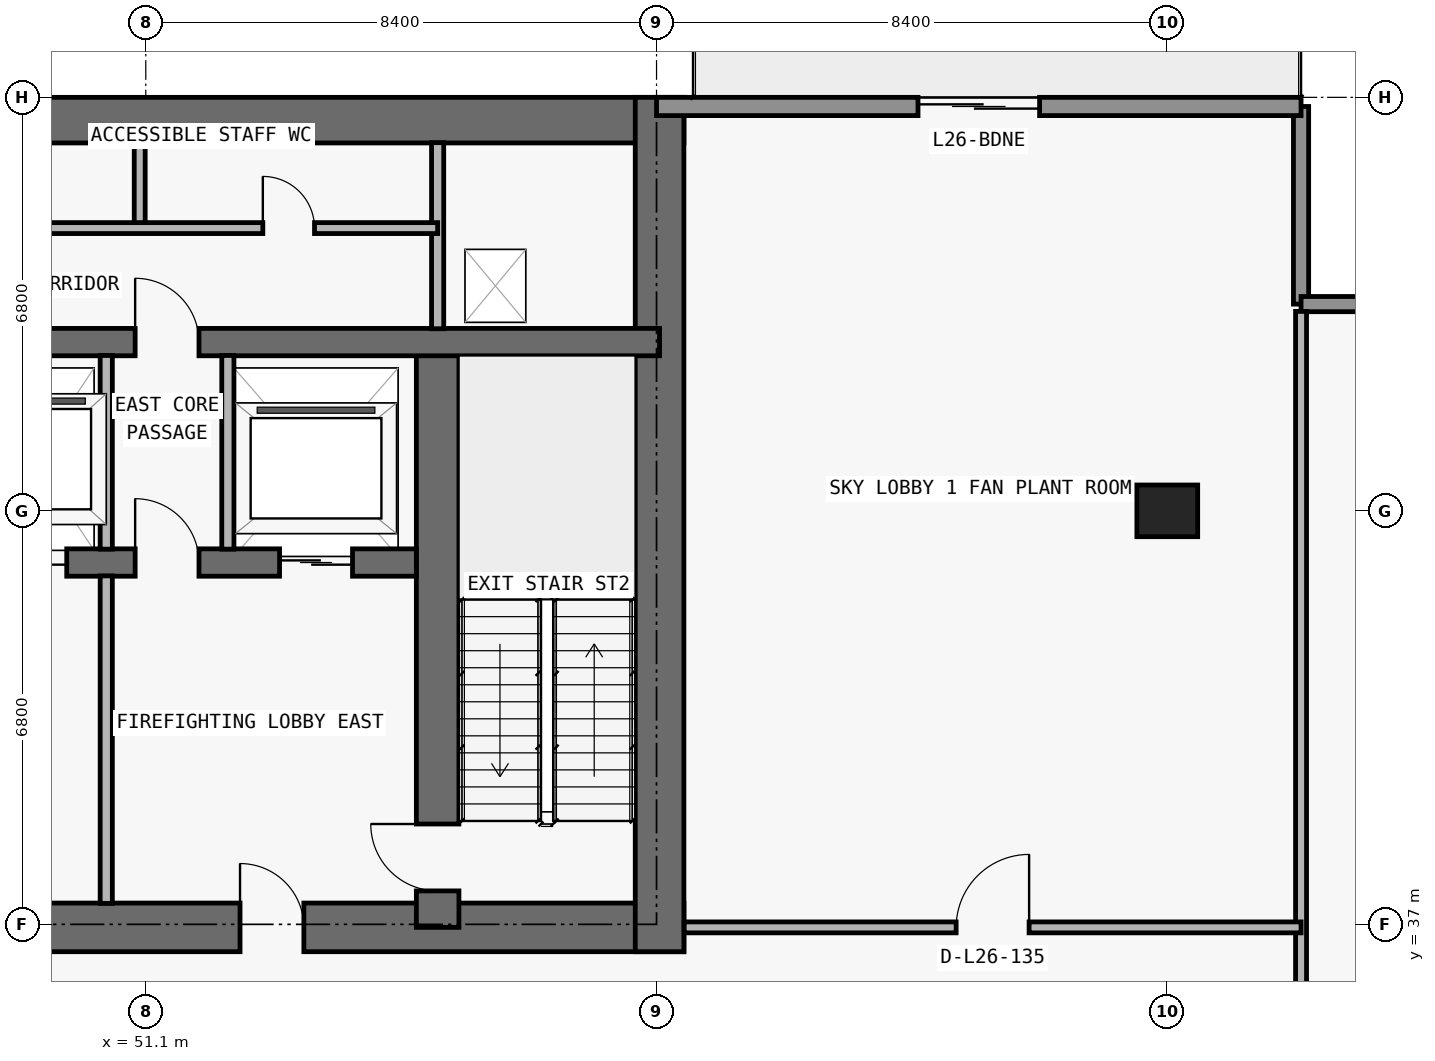
"""IFC4 building model, lengths in metres.
Left out: names, types, materials, properties, quantities, classifications, styles, units other than length and angle.
Written with IfcOpenShell. Run it as: python <this file> out.ifc"""

import sys

from ifc_helpers import new_model, si_unit, direction, frame, frame_2d, origin, origin_2d, place, context, subcontext, project, spatial, rectangle, extrude, element, fill, save


model = new_model("IFC4")
c1 = context("Model", 3, precision=1e-05, world=origin(), true_north=direction((0.0, 1.0)))
c2 = subcontext(c1, "Body", "Model", "MODEL_VIEW")
j1 = project(units=[si_unit("LENGTHUNIT", "METRE"), si_unit("PLANEANGLEUNIT", "RADIAN")], contexts=[c1])
p1 = place(None, origin())
s1 = spatial("IfcSite", under=j1, at=p1, CompositionType="ELEMENT")
p2 = place(p1, origin())
s2 = spatial("IfcBuilding", under=s1, at=p2, CompositionType="ELEMENT")
p3 = place(p2, frame((0.0, 0.0, 97.8)))
s3 = spatial("IfcBuildingStorey", under=s2, at=p3, CompositionType="ELEMENT", Elevation=97.8)
p4 = place(p3, frame((67.9, 43.8, 0.0), z_axis=(0.0, 0.0, 1.0), x_axis=(1.0, 0.0, 0.0)))
e1 = element("IfcColumn", 1, at=p4, inside=s3, PredefinedType="COLUMN", context=c2, shape_type="SweptSolid", body=[
    extrude(rectangle(XDim=1.0, YDim=0.85, at=origin_2d()), origin(), (0.0, 0.0, 1.0), 4.55),
])
p5 = place(p3, frame((17.85, 36.95, 0.0), z_axis=(0.0, 0.0, 1.0), x_axis=(1.0, 0.0, 0.0)))
e2 = element("IfcWall", 2, at=p5, inside=s3, PredefinedType="SHEAR", context=c2, shape_type="SweptSolid", body=[
    extrude(rectangle(XDim=42.1, YDim=0.8, at=frame_2d((21.05, 0.0))), origin(), (0.0, 0.0, 1.0), 4.55),
])
p6 = place(p5, frame((14.45, 0.0, 0.0)))
e3 = element("IfcOpeningElement", 3, at=p6, cuts=e2, PredefinedType="OPENING", context=c2, shape_type="SweptSolid", body=[
    extrude(rectangle(XDim=1.1, YDim=2.15, at=frame_2d((0.55, 1.075))), frame((0.0, 0.41, 0.0), z_axis=(0.0, -1.0, 0.0), x_axis=(1.0, 0.0, 0.0)), (0.0, 0.0, 1.0), 0.82),
])
p7 = place(p5, frame((6.3, 0.0, 0.0)))
e4 = element("IfcOpeningElement", 4, at=p7, cuts=e2, PredefinedType="OPENING", context=c2, shape_type="SweptSolid", body=[
    extrude(rectangle(XDim=1.05, YDim=2.15, at=frame_2d((0.525, 1.075))), frame((0.0, 0.41, 0.0), z_axis=(0.0, -1.0, 0.0), x_axis=(1.0, 0.0, 0.0)), (0.0, 0.0, 1.0), 0.82),
])
p8 = place(p5, frame((34.8, 0.0, 0.0)))
e5 = element("IfcOpeningElement", 5, at=p8, cuts=e2, PredefinedType="OPENING", context=c2, shape_type="SweptSolid", body=[
    extrude(rectangle(XDim=1.05, YDim=2.15, at=frame_2d((0.525, 1.075))), frame((0.0, 0.41, 0.0), z_axis=(0.0, -1.0, 0.0), x_axis=(1.0, 0.0, 0.0)), (0.0, 0.0, 1.0), 0.82),
])
p9 = place(p5, frame((10.913, 0.0, 0.0)))
e6 = element("IfcOpeningElement", 6, at=p9, cuts=e2, PredefinedType="OPENING", context=c2, shape_type="SweptSolid", body=[
    extrude(rectangle(XDim=1.05, YDim=2.15, at=frame_2d((0.525, 1.075))), frame((0.0, 0.41, 0.0), z_axis=(0.0, -1.0, 0.0), x_axis=(1.0, 0.0, 0.0)), (0.0, 0.0, 1.0), 0.82),
])
p10 = place(p5, frame((24.15, 0.0, 0.0)))
e7 = element("IfcOpeningElement", 7, at=p10, cuts=e2, PredefinedType="OPENING", context=c2, shape_type="SweptSolid", body=[
    extrude(rectangle(XDim=1.05, YDim=2.15, at=frame_2d((0.525, 1.075))), frame((0.0, 0.41, 0.0), z_axis=(0.0, -1.0, 0.0), x_axis=(1.0, 0.0, 0.0)), (0.0, 0.0, 1.0), 0.82),
])
p11 = place(p3, frame((17.85, 50.225, 0.0), z_axis=(0.0, 0.0, 1.0), x_axis=(1.0, 0.0, 0.0)))
e8 = element("IfcWall", 8, at=p11, inside=s3, PredefinedType="SHEAR", context=c2, shape_type="SweptSolid", body=[
    extrude(rectangle(XDim=42.1, YDim=0.75, at=frame_2d((21.05, 0.0))), origin(), (0.0, 0.0, 1.0), 4.55),
])
p12 = place(p3, frame((59.55, 36.55, 0.0), z_axis=(0.0, 0.0, 1.0), x_axis=(0.0, 1.0, 0.0)))
e9 = element("IfcWall", 9, at=p12, inside=s3, PredefinedType="SHEAR", context=c2, shape_type="SweptSolid", body=[
    extrude(rectangle(XDim=14.05, YDim=0.8, at=frame_2d((7.025, 0.0))), origin(), (0.0, 0.0, 1.0), 4.55),
])
p13 = place(p3, frame((55.9, 36.95, 0.0), z_axis=(0.0, 0.0, 1.0), x_axis=(0.0, 1.0, 0.0)))
e10 = element("IfcWall", 10, at=p13, inside=s3, PredefinedType="SHEAR", context=c2, shape_type="SweptSolid", body=[
    extrude(rectangle(XDim=9.625, YDim=0.7, at=frame_2d((4.812, 0.0))), origin(), (0.0, 0.0, 1.0), 4.55),
])
p14 = place(p13, frame((0.6, 0.0, 0.0)))
e11 = element("IfcOpeningElement", 11, at=p14, cuts=e10, PredefinedType="OPENING", context=c2, shape_type="SweptSolid", body=[
    extrude(rectangle(XDim=1.1, YDim=2.15, at=frame_2d((0.55, 1.075))), frame((0.0, 0.36, 0.0), z_axis=(0.0, -1.0, 0.0), x_axis=(1.0, 0.0, 0.0)), (0.0, 0.0, 1.0), 0.72),
])
p15 = place(p3, frame((22.25, 42.95, 0.0), z_axis=(0.0, 0.0, 1.0), x_axis=(1.0, 0.0, 0.0)))
e12 = element("IfcWall", 12, at=p15, inside=s3, PredefinedType="SHEAR", context=c2, shape_type="SweptSolid", body=[
    extrude(rectangle(XDim=33.3, YDim=0.45, at=frame_2d((16.65, 0.0))), origin(), (0.0, 0.0, 1.0), 4.55),
])
p16 = place(p15, frame((1.05, 0.0, 0.0)))
e13 = element("IfcOpeningElement", 13, at=p16, cuts=e12, PredefinedType="OPENING", context=c2, shape_type="SweptSolid", body=[
    extrude(rectangle(XDim=1.2, YDim=2.2, at=frame_2d((0.6, 1.1))), frame((0.0, 0.235, 0.0), z_axis=(0.0, -1.0, 0.0), x_axis=(1.0, 0.0, 0.0)), (0.0, 0.0, 1.0), 0.47),
])
p17 = place(p15, frame((31.05, 0.0, 0.0)))
e14 = element("IfcOpeningElement", 14, at=p17, cuts=e12, PredefinedType="OPENING", context=c2, shape_type="SweptSolid", body=[
    extrude(rectangle(XDim=1.2, YDim=2.2, at=frame_2d((0.6, 1.1))), frame((0.0, 0.235, 0.0), z_axis=(0.0, -1.0, 0.0), x_axis=(1.0, 0.0, 0.0)), (0.0, 0.0, 1.0), 0.47),
])
p18 = place(p15, frame((13.5, 0.0, 0.0)))
e15 = element("IfcOpeningElement", 15, at=p18, cuts=e12, PredefinedType="OPENING", context=c2, shape_type="SweptSolid", body=[
    extrude(rectangle(XDim=1.1, YDim=2.2, at=frame_2d((0.55, 1.1))), frame((0.0, 0.235, 0.0), z_axis=(0.0, -1.0, 0.0), x_axis=(1.0, 0.0, 0.0)), (0.0, 0.0, 1.0), 0.47),
])
p19 = place(p15, frame((16.1, 0.0, 0.0)))
e16 = element("IfcOpeningElement", 16, at=p19, cuts=e12, PredefinedType="OPENING", context=c2, shape_type="SweptSolid", body=[
    extrude(rectangle(XDim=1.1, YDim=2.2, at=frame_2d((0.55, 1.1))), frame((0.0, 0.235, 0.0), z_axis=(0.0, -1.0, 0.0), x_axis=(1.0, 0.0, 0.0)), (0.0, 0.0, 1.0), 0.47),
])
p20 = place(p15, frame((18.7, 0.0, 0.0)))
e17 = element("IfcOpeningElement", 17, at=p20, cuts=e12, PredefinedType="OPENING", context=c2, shape_type="SweptSolid", body=[
    extrude(rectangle(XDim=1.1, YDim=2.2, at=frame_2d((0.55, 1.1))), frame((0.0, 0.235, 0.0), z_axis=(0.0, -1.0, 0.0), x_axis=(1.0, 0.0, 0.0)), (0.0, 0.0, 1.0), 0.47),
])
p21 = place(p15, frame((21.4, 0.0, 0.0)))
e18 = element("IfcOpeningElement", 18, at=p21, cuts=e12, PredefinedType="OPENING", context=c2, shape_type="SweptSolid", body=[
    extrude(rectangle(XDim=1.1, YDim=2.2, at=frame_2d((0.55, 1.1))), frame((0.0, 0.235, 0.0), z_axis=(0.0, -1.0, 0.0), x_axis=(1.0, 0.0, 0.0)), (0.0, 0.0, 1.0), 0.47),
])
p22 = place(p15, frame((24.0, 0.0, 0.0)))
e19 = element("IfcOpeningElement", 19, at=p22, cuts=e12, PredefinedType="OPENING", context=c2, shape_type="SweptSolid", body=[
    extrude(rectangle(XDim=1.1, YDim=2.2, at=frame_2d((0.55, 1.1))), frame((0.0, 0.235, 0.0), z_axis=(0.0, -1.0, 0.0), x_axis=(1.0, 0.0, 0.0)), (0.0, 0.0, 1.0), 0.47),
])
p23 = place(p15, frame((26.45, 0.0, 0.0)))
e20 = element("IfcOpeningElement", 20, at=p23, cuts=e12, PredefinedType="OPENING", context=c2, shape_type="SweptSolid", body=[
    extrude(rectangle(XDim=1.1, YDim=2.2, at=frame_2d((0.55, 1.1))), frame((0.0, 0.235, 0.0), z_axis=(0.0, -1.0, 0.0), x_axis=(1.0, 0.0, 0.0)), (0.0, 0.0, 1.0), 0.47),
])
p24 = place(p15, frame((5.95, 0.0, 0.0)))
e21 = element("IfcOpeningElement", 21, at=p24, cuts=e12, PredefinedType="OPENING", context=c2, shape_type="SweptSolid", body=[
    extrude(rectangle(XDim=1.1, YDim=2.2, at=frame_2d((0.55, 1.1))), frame((0.0, 0.235, 0.0), z_axis=(0.0, -1.0, 0.0), x_axis=(1.0, 0.0, 0.0)), (0.0, 0.0, 1.0), 0.47),
])
p25 = place(p15, frame((3.625, 0.0, 0.0)))
e22 = element("IfcOpeningElement", 22, at=p25, cuts=e12, PredefinedType="OPENING", context=c2, shape_type="SweptSolid", body=[
    extrude(rectangle(XDim=1.05, YDim=2.15, at=frame_2d((0.525, 1.075))), frame((0.0, 0.235, 0.0), z_axis=(0.0, -1.0, 0.0), x_axis=(1.0, 0.0, 0.0)), (0.0, 0.0, 1.0), 0.47),
])
p26 = place(p15, frame((28.675, 0.0, 0.0)))
e23 = element("IfcOpeningElement", 23, at=p26, cuts=e12, PredefinedType="OPENING", context=c2, shape_type="SweptSolid", body=[
    extrude(rectangle(XDim=1.05, YDim=2.15, at=frame_2d((0.525, 1.075))), frame((0.0, 0.235, 0.0), z_axis=(0.0, -1.0, 0.0), x_axis=(1.0, 0.0, 0.0)), (0.0, 0.0, 1.0), 0.47),
])
p27 = place(p3, frame((18.25, 46.575, 0.0), z_axis=(0.0, 0.0, 1.0), x_axis=(1.0, 0.0, 0.0)))
e24 = element("IfcWall", 24, at=p27, inside=s3, PredefinedType="SHEAR", context=c2, shape_type="SweptSolid", body=[
    extrude(rectangle(XDim=41.3, YDim=0.45, at=frame_2d((20.65, 0.0))), origin(), (0.0, 0.0, 1.0), 4.55),
])
p28 = place(p27, frame((7.65, 0.0, 0.0)))
e25 = element("IfcOpeningElement", 25, at=p28, cuts=e24, PredefinedType="OPENING", context=c2, shape_type="SweptSolid", body=[
    extrude(rectangle(XDim=1.0, YDim=2.2, at=frame_2d((0.5, 1.1))), frame((0.0, 0.235, 0.0), z_axis=(0.0, -1.0, 0.0), x_axis=(1.0, 0.0, 0.0)), (0.0, 0.0, 1.0), 0.47),
])
p29 = place(p27, frame((32.675, 0.0, 0.0)))
e26 = element("IfcOpeningElement", 26, at=p29, cuts=e24, PredefinedType="OPENING", context=c2, shape_type="SweptSolid", body=[
    extrude(rectangle(XDim=1.05, YDim=2.15, at=frame_2d((0.525, 1.075))), frame((0.0, 0.235, 0.0), z_axis=(0.0, -1.0, 0.0), x_axis=(1.0, 0.0, 0.0)), (0.0, 0.0, 1.0), 0.47),
])
p30 = place(p3, frame((70.1, 50.45, 0.0), z_axis=(0.0, 0.0, 1.0), x_axis=(0.0, -1.0, 0.0)))
e27 = element("IfcWall", 27, at=p30, inside=s3, PredefinedType="ELEMENTEDWALL", context=c2, shape_type="SweptSolid", body=[
    extrude(rectangle(XDim=3.25, YDim=0.25, at=frame_2d((1.625, 0.0))), origin(), (0.0, 0.0, 1.0), 4.55),
])
p31 = place(p3, frame((70.1, 47.2, 0.0), z_axis=(0.0, 0.0, 1.0), x_axis=(1.0, 0.0, 0.0)))
e28 = element("IfcWall", 28, at=p31, inside=s3, PredefinedType="ELEMENTEDWALL", context=c2, shape_type="SweptSolid", body=[
    extrude(rectangle(XDim=3.65, YDim=0.25, at=frame_2d((1.825, 0.0))), origin(), (0.0, 0.0, 1.0), 4.55),
])
p32 = place(p3, frame((59.5, 50.45, 0.0), z_axis=(0.0, 0.0, 1.0), x_axis=(1.0, 0.0, 0.0)))
e29 = element("IfcWall", 29, at=p32, inside=s3, PredefinedType="STANDARD", context=c2, shape_type="SweptSolid", body=[
    extrude(rectangle(XDim=10.6, YDim=0.3, at=frame_2d((5.3, 0.0))), origin(), (0.0, 0.0, 1.0), 4.55),
])
p33 = place(p32, frame((4.3, 0.0, 0.0)))
e30 = element("IfcOpeningElement", 30, at=p33, cuts=e29, PredefinedType="OPENING", context=c2, shape_type="SweptSolid", body=[
    extrude(rectangle(XDim=2.0, YDim=2.3, at=frame_2d((1.0, 1.15))), frame((0.0, 0.16, 0.0), z_axis=(0.0, -1.0, 0.0), x_axis=(1.0, 0.0, 0.0)), (0.0, 0.0, 1.0), 0.32),
])
p34 = place(p3, frame((50.45, 37.345, 0.0), z_axis=(0.0, 0.0, 1.0), x_axis=(0.0, 1.0, 0.0)))
e31 = element("IfcWall", 31, at=p34, inside=s3, PredefinedType="PARTITIONING", context=c2, shape_type="SweptSolid", body=[
    extrude(rectangle(XDim=5.385, YDim=0.2, at=frame_2d((2.692, 0.0))), origin(), (0.0, 0.0, 1.0), 4.55),
])
p35 = place(p3, frame((50.45, 43.17, 0.0), z_axis=(0.0, 0.0, 1.0), x_axis=(0.0, 1.0, 0.0)))
e32 = element("IfcWall", 32, at=p35, inside=s3, PredefinedType="PARTITIONING", context=c2, shape_type="SweptSolid", body=[
    extrude(rectangle(XDim=3.185, YDim=0.2, at=frame_2d((1.593, 0.0))), origin(), (0.0, 0.0, 1.0), 4.55),
])
p36 = place(p3, frame((51.0, 48.45, 0.0), z_axis=(0.0, 0.0, 1.0), x_axis=(0.0, 1.0, 0.0)))
e33 = element("IfcWall", 33, at=p36, inside=s3, PredefinedType="PARTITIONING", context=c2, shape_type="SweptSolid", body=[
    extrude(rectangle(XDim=1.405, YDim=0.18, at=frame_2d((0.703, 0.0))), origin(), (0.0, 0.0, 1.0), 4.55),
])
p37 = place(p3, frame((52.45, 43.17, 0.0), z_axis=(0.0, 0.0, 1.0), x_axis=(0.0, 1.0, 0.0)))
e34 = element("IfcWall", 34, at=p37, inside=s3, PredefinedType="PARTITIONING", context=c2, shape_type="SweptSolid", body=[
    extrude(rectangle(XDim=3.185, YDim=0.2, at=frame_2d((1.593, 0.0))), origin(), (0.0, 0.0, 1.0), 4.55),
])
p38 = place(p3, frame((55.9, 46.795, 0.0), z_axis=(0.0, 0.0, 1.0), x_axis=(0.0, 1.0, 0.0)))
e35 = element("IfcWall", 35, at=p38, inside=s3, PredefinedType="PARTITIONING", context=c2, shape_type="SweptSolid", body=[
    extrude(rectangle(XDim=3.06, YDim=0.2, at=frame_2d((1.53, 0.0))), origin(), (0.0, 0.0, 1.0), 4.55),
])
p39 = place(p3, frame((70.1, 8.92, 0.0), z_axis=(0.0, 0.0, 1.0), x_axis=(0.0, 1.0, 0.0)))
e36 = element("IfcWall", 36, at=p39, inside=s3, PredefinedType="PARTITIONING", context=c2, shape_type="SweptSolid", body=[
    extrude(rectangle(XDim=38.16, YDim=0.18, at=frame_2d((19.08, 0.0))), origin(), (0.0, 0.0, 1.0), 4.55),
])
p40 = place(p3, frame((59.955, 36.95, 0.0), z_axis=(0.0, 0.0, 1.0), x_axis=(1.0, 0.0, 0.0)))
e37 = element("IfcWall", 37, at=p40, inside=s3, PredefinedType="PARTITIONING", context=c2, shape_type="SweptSolid", body=[
    extrude(rectangle(XDim=10.145, YDim=0.18, at=frame_2d((5.073, 0.0))), origin(), (0.0, 0.0, 1.0), 4.55),
])
p41 = place(p40, frame((4.472, 0.0, 0.0)))
e38 = element("IfcOpeningElement", 38, at=p41, cuts=e37, PredefinedType="OPENING", context=c2, shape_type="SweptSolid", body=[
    extrude(rectangle(XDim=1.2, YDim=2.2, at=frame_2d((0.6, 1.1))), frame((0.0, 0.1, 0.0), z_axis=(0.0, -1.0, 0.0), x_axis=(1.0, 0.0, 0.0)), (0.0, 0.0, 1.0), 0.2),
])
p42 = place(p3, frame((41.2, 48.45, 0.0), z_axis=(0.0, 0.0, 1.0), x_axis=(1.0, 0.0, 0.0)))
e39 = element("IfcWall", 39, at=p42, inside=s3, PredefinedType="PARTITIONING", context=c2, shape_type="SweptSolid", body=[
    extrude(rectangle(XDim=14.7, YDim=0.18, at=frame_2d((7.35, 0.0))), origin(), (0.0, 0.0, 1.0), 4.55),
])
p43 = place(p42, frame((1.85, 0.0, 0.0)))
e40 = element("IfcOpeningElement", 40, at=p43, cuts=e39, PredefinedType="OPENING", context=c2, shape_type="SweptSolid", body=[
    extrude(rectangle(XDim=1.2, YDim=2.2, at=frame_2d((0.6, 1.1))), frame((0.0, 0.1, 0.0), z_axis=(0.0, -1.0, 0.0), x_axis=(1.0, 0.0, 0.0)), (0.0, 0.0, 1.0), 0.2),
])
p44 = place(p42, frame((6.75, 0.0, 0.0)))
e41 = element("IfcOpeningElement", 41, at=p44, cuts=e39, PredefinedType="OPENING", context=c2, shape_type="SweptSolid", body=[
    extrude(rectangle(XDim=1.2, YDim=2.2, at=frame_2d((0.6, 1.1))), frame((0.0, 0.1, 0.0), z_axis=(0.0, -1.0, 0.0), x_axis=(1.0, 0.0, 0.0)), (0.0, 0.0, 1.0), 0.2),
])
p45 = place(p42, frame((11.825, 0.0, 0.0)))
e42 = element("IfcOpeningElement", 42, at=p45, cuts=e39, PredefinedType="OPENING", context=c2, shape_type="SweptSolid", body=[
    extrude(rectangle(XDim=0.85, YDim=2.1, at=frame_2d((0.425, 1.05))), frame((0.0, 0.1, 0.0), z_axis=(0.0, -1.0, 0.0), x_axis=(1.0, 0.0, 0.0)), (0.0, 0.0, 1.0), 0.2),
])
p46 = place(p33, origin())
e43 = element("IfcDoor", 43, at=p46, inside=s3, OperationType="DOUBLE_DOOR_SLIDING", PredefinedType="DOOR", context=c2, shape_type="SweptSolid", body=[
    extrude(rectangle(XDim=2.0, YDim=2.3, at=frame_2d((1.0, 1.15))), frame((0.0, 0.025, 0.0), z_axis=(0.0, -1.0, 0.0), x_axis=(1.0, 0.0, 0.0)), (0.0, 0.0, 1.0), 0.05),
])
fill(e30, e43)
p47 = place(p17, origin())
e44 = element("IfcDoor", 44, at=p47, inside=s3, OperationType="DOUBLE_DOOR_SLIDING", PredefinedType="DOOR", context=c2, shape_type="SweptSolid", body=[
    extrude(rectangle(XDim=1.2, YDim=2.2, at=frame_2d((0.6, 1.1))), frame((0.0, 0.025, 0.0), z_axis=(0.0, -1.0, 0.0), x_axis=(1.0, 0.0, 0.0)), (0.0, 0.0, 1.0), 0.05),
])
fill(e14, e44)
p48 = place(p23, origin())
e45 = element("IfcDoor", 45, at=p48, inside=s3, OperationType="DOUBLE_DOOR_SLIDING", PredefinedType="DOOR", context=c2, shape_type="SweptSolid", body=[
    extrude(rectangle(XDim=1.1, YDim=2.2, at=frame_2d((0.55, 1.1))), frame((0.0, 0.025, 0.0), z_axis=(0.0, -1.0, 0.0), x_axis=(1.0, 0.0, 0.0)), (0.0, 0.0, 1.0), 0.05),
])
fill(e20, e45)
p49 = place(p8, origin())
e46 = element("IfcDoor", 46, at=p49, inside=s3, OperationType="SINGLE_SWING_LEFT", PredefinedType="DOOR", context=c2, shape_type="SweptSolid", body=[
    extrude(rectangle(XDim=1.05, YDim=2.15, at=frame_2d((0.525, 1.075))), frame((0.0, 0.025, 0.0), z_axis=(0.0, -1.0, 0.0), x_axis=(1.0, 0.0, 0.0)), (0.0, 0.0, 1.0), 0.05),
])
fill(e5, e46)
p50 = place(p14, origin())
e47 = element("IfcDoor", 47, at=p50, inside=s3, OperationType="SINGLE_SWING_RIGHT", PredefinedType="DOOR", context=c2, shape_type="SweptSolid", body=[
    extrude(rectangle(XDim=1.1, YDim=2.15, at=frame_2d((0.55, 1.075))), frame((0.0, 0.025, 0.0), z_axis=(0.0, -1.0, 0.0), x_axis=(1.0, 0.0, 0.0)), (0.0, 0.0, 1.0), 0.05),
])
fill(e11, e47)
p51 = place(p26, origin())
e48 = element("IfcDoor", 48, at=p51, inside=s3, OperationType="SINGLE_SWING_LEFT", PredefinedType="DOOR", context=c2, shape_type="SweptSolid", body=[
    extrude(rectangle(XDim=1.05, YDim=2.15, at=frame_2d((0.525, 1.075))), frame((0.0, 0.025, 0.0), z_axis=(0.0, -1.0, 0.0), x_axis=(1.0, 0.0, 0.0)), (0.0, 0.0, 1.0), 0.05),
])
fill(e23, e48)
p52 = place(p29, origin())
e49 = element("IfcDoor", 49, at=p52, inside=s3, OperationType="SINGLE_SWING_LEFT", PredefinedType="DOOR", context=c2, shape_type="SweptSolid", body=[
    extrude(rectangle(XDim=1.05, YDim=2.15, at=frame_2d((0.525, 1.075))), frame((0.0, 0.025, 0.0), z_axis=(0.0, -1.0, 0.0), x_axis=(1.0, 0.0, 0.0)), (0.0, 0.0, 1.0), 0.05),
])
fill(e26, e49)
p53 = place(p45, origin())
e50 = element("IfcDoor", 50, at=p53, inside=s3, OperationType="SINGLE_SWING_LEFT", PredefinedType="DOOR", context=c2, shape_type="SweptSolid", body=[
    extrude(rectangle(XDim=0.85, YDim=2.1, at=frame_2d((0.425, 1.05))), frame((0.0, 0.025, 0.0), z_axis=(0.0, -1.0, 0.0), x_axis=(1.0, 0.0, 0.0)), (0.0, 0.0, 1.0), 0.05),
])
fill(e42, e50)
p54 = place(p41, origin())
e51 = element("IfcDoor", 51, at=p54, inside=s3, OperationType="SINGLE_SWING_RIGHT", PredefinedType="DOOR", context=c2, shape_type="SweptSolid", body=[
    extrude(rectangle(XDim=1.2, YDim=2.2, at=frame_2d((0.6, 1.1))), frame((0.0, 0.025, 0.0), z_axis=(0.0, -1.0, 0.0), x_axis=(1.0, 0.0, 0.0)), (0.0, 0.0, 1.0), 0.05),
])
fill(e38, e51)
save(model, sys.argv[1])
